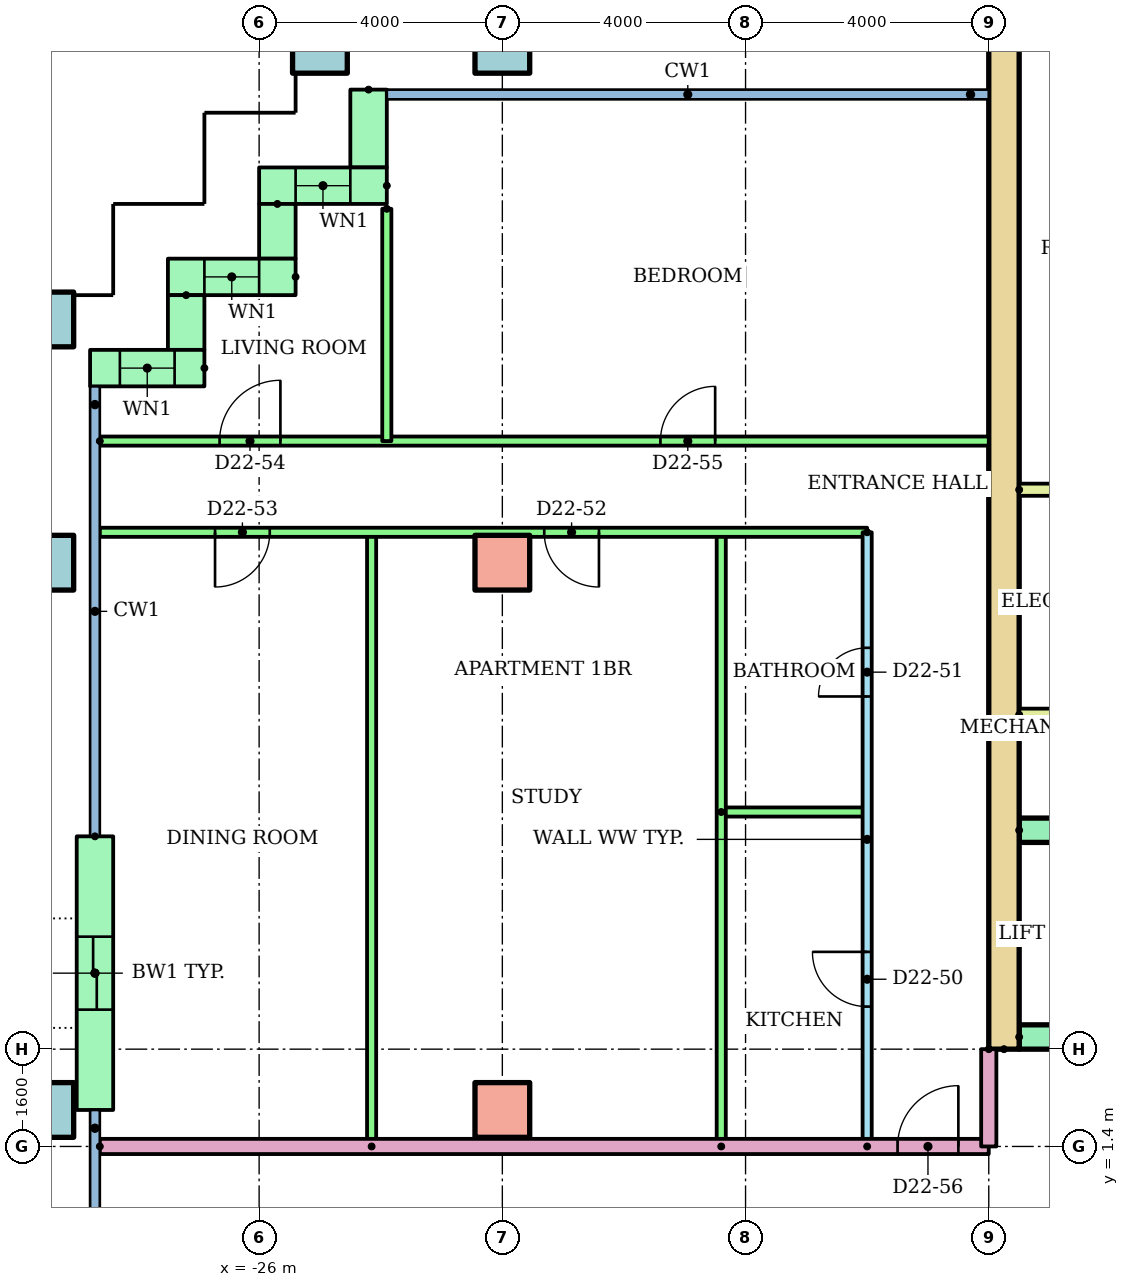
"""IFC4 building model, lengths in metres.
Left out: names, types, materials, properties, quantities, classifications, styles, units other than length and angle.
Written with IfcOpenShell. Run it as: python <this file> out.ifc"""

import sys

from ifc_helpers import new_model, si_unit, direction, frame, frame_2d, origin, origin_2d, place, context, subcontext, project, spatial, rectangle, hollow_rectangle, extrude, element, fill, save


model = new_model("IFC4")
c1 = context("Model", 3, precision=1e-05, world=origin(), true_north=direction((0.0, 1.0)))
c2 = subcontext(c1, "Body", "Model", "MODEL_VIEW")
j1 = project(units=[si_unit("LENGTHUNIT", "METRE"), si_unit("PLANEANGLEUNIT", "RADIAN")], contexts=[c1])
p1 = place(None, origin())
s1 = spatial("IfcSite", under=j1, at=p1, CompositionType="ELEMENT")
p2 = place(p1, origin())
s2 = spatial("IfcBuilding", under=s1, at=p2, CompositionType="ELEMENT")
p3 = place(p2, frame((0.0, 0.0, 87.1)))
s3 = spatial("IfcBuildingStorey", under=s2, at=p3, CompositionType="ELEMENT", Elevation=87.1)
p4 = place(p3, frame((-29.5, 2.0, 0.0)))
e1 = element("IfcColumn", 1, at=p4, inside=s3, PredefinedType="COLUMN", context=c2, shape_type="SweptSolid", body=[
    extrude(hollow_rectangle(XDim=0.9, YDim=0.9, WallThickness=0.045, at=origin_2d()), origin(), (0.0, 0.0, 1.0), 3.2),
])
p5 = place(p3, frame((-22.0, 2.0, 0.0)))
e2 = element("IfcColumn", 2, at=p5, inside=s3, PredefinedType="COLUMN", context=c2, shape_type="SweptSolid", body=[
    extrude(rectangle(XDim=0.9, YDim=0.9, at=origin_2d()), origin(), (0.0, 0.0, 1.0), 3.2),
])
p6 = place(p3, frame((-29.5, 11.0, 0.0)))
e3 = element("IfcColumn", 3, at=p6, inside=s3, PredefinedType="COLUMN", context=c2, shape_type="SweptSolid", body=[
    extrude(hollow_rectangle(XDim=0.9, YDim=0.9, WallThickness=0.045, at=origin_2d()), origin(), (0.0, 0.0, 1.0), 3.2),
])
p7 = place(p3, frame((-22.0, 11.0, 0.0)))
e4 = element("IfcColumn", 4, at=p7, inside=s3, PredefinedType="COLUMN", context=c2, shape_type="SweptSolid", body=[
    extrude(rectangle(XDim=0.9, YDim=0.9, at=origin_2d()), origin(), (0.0, 0.0, 1.0), 3.2),
])
for number, where in (
    (5, (-29.5, 15.0, 0.0)),
    (6, (-25.0, 19.5, 0.0)),
    (7, (-22.0, 19.5, 0.0)),
):
    element("IfcColumn", number, at=place(p3, frame(where)), inside=s3, PredefinedType="COLUMN", context=c2, shape_type="SweptSolid", body=[
        extrude(hollow_rectangle(XDim=0.9, YDim=0.9, WallThickness=0.045, at=origin_2d()), origin(), (0.0, 0.0, 1.0), 3.2),
    ])
p8 = place(p3, frame((-24.2, 18.78, 0.0), z_axis=(0.0, 0.0, 1.0), x_axis=(0.0, -1.0, 0.0)))
e8 = element("IfcWall", 8, at=p8, inside=s3, PredefinedType="STANDARD", context=c2, shape_type="SweptSolid", body=[
    extrude(rectangle(XDim=1.28, YDim=0.6, at=frame_2d((0.64, 0.0))), origin(), (0.0, 0.0, 1.0), 2.92),
])
p9 = place(p3, frame((-23.9, 17.2, 0.0), z_axis=(0.0, 0.0, 1.0), x_axis=(-1.0, 0.0, 0.0)))
e9 = element("IfcWall", 9, at=p9, inside=s3, PredefinedType="STANDARD", context=c2, shape_type="SweptSolid", body=[
    extrude(rectangle(XDim=2.1, YDim=0.6, at=frame_2d((1.05, 0.0))), origin(), (0.0, 0.0, 1.0), 2.92),
])
p10 = place(p9, frame((0.6, 0.0, 0.9)))
e10 = element("IfcOpeningElement", 10, at=p10, cuts=e9, PredefinedType="OPENING", context=c2, shape_type="SweptSolid", body=[
    extrude(rectangle(XDim=0.9, YDim=1.5, at=frame_2d((0.45, 0.75))), frame((0.0, 0.31, 0.0), z_axis=(0.0, -1.0, 0.0), x_axis=(1.0, 0.0, 0.0)), (0.0, 0.0, 1.0), 0.62),
])
p11 = place(p3, frame((-25.7, 16.9, 0.0), z_axis=(0.0, 0.0, 1.0), x_axis=(0.0, -1.0, 0.0)))
e11 = element("IfcWall", 11, at=p11, inside=s3, PredefinedType="STANDARD", context=c2, shape_type="SweptSolid", body=[
    extrude(rectangle(XDim=0.9, YDim=0.6, at=frame_2d((0.45, 0.0))), origin(), (0.0, 0.0, 1.0), 2.92),
])
p12 = place(p3, frame((-25.4, 15.7, 0.0), z_axis=(0.0, 0.0, 1.0), x_axis=(-1.0, 0.0, 0.0)))
e12 = element("IfcWall", 12, at=p12, inside=s3, PredefinedType="STANDARD", context=c2, shape_type="SweptSolid", body=[
    extrude(rectangle(XDim=2.1, YDim=0.6, at=frame_2d((1.05, 0.0))), origin(), (0.0, 0.0, 1.0), 2.92),
])
p13 = place(p12, frame((0.6, 0.0, 0.9)))
e13 = element("IfcOpeningElement", 13, at=p13, cuts=e12, PredefinedType="OPENING", context=c2, shape_type="SweptSolid", body=[
    extrude(rectangle(XDim=0.9, YDim=1.5, at=frame_2d((0.45, 0.75))), frame((0.0, 0.31, 0.0), z_axis=(0.0, -1.0, 0.0), x_axis=(1.0, 0.0, 0.0)), (0.0, 0.0, 1.0), 0.62),
])
p14 = place(p3, frame((-27.2, 15.4, 0.0), z_axis=(0.0, 0.0, 1.0), x_axis=(0.0, -1.0, 0.0)))
e14 = element("IfcWall", 14, at=p14, inside=s3, PredefinedType="STANDARD", context=c2, shape_type="SweptSolid", body=[
    extrude(rectangle(XDim=0.9, YDim=0.6, at=frame_2d((0.45, 0.0))), origin(), (0.0, 0.0, 1.0), 2.92),
])
p15 = place(p3, frame((-26.9, 14.2, 0.0), z_axis=(0.0, 0.0, 1.0), x_axis=(-1.0, 0.0, 0.0)))
e15 = element("IfcWall", 15, at=p15, inside=s3, PredefinedType="STANDARD", context=c2, shape_type="SweptSolid", body=[
    extrude(rectangle(XDim=1.88, YDim=0.6, at=frame_2d((0.94, 0.0))), origin(), (0.0, 0.0, 1.0), 2.92),
])
p16 = place(p15, frame((0.49, 0.0, 0.9)))
e16 = element("IfcOpeningElement", 16, at=p16, cuts=e15, PredefinedType="OPENING", context=c2, shape_type="SweptSolid", body=[
    extrude(rectangle(XDim=0.9, YDim=1.5, at=frame_2d((0.45, 0.75))), frame((0.0, 0.31, 0.0), z_axis=(0.0, -1.0, 0.0), x_axis=(1.0, 0.0, 0.0)), (0.0, 0.0, 1.0), 0.62),
])
p17 = place(p3, frame((-28.7, 6.5, 0.0), z_axis=(0.0, 0.0, 1.0), x_axis=(0.0, -1.0, 0.0)))
e17 = element("IfcWall", 17, at=p17, inside=s3, PredefinedType="STANDARD", context=c2, shape_type="SweptSolid", body=[
    extrude(rectangle(XDim=4.5, YDim=0.6, at=frame_2d((2.25, 0.0))), origin(), (0.0, 0.0, 1.0), 2.92),
])
p18 = place(p17, frame((1.65, 0.0, 0.0)))
e18 = element("IfcOpeningElement", 18, at=p18, cuts=e17, PredefinedType="OPENING", context=c2, shape_type="SweptSolid", body=[
    extrude(rectangle(XDim=1.2, YDim=2.1, at=frame_2d((0.6, 1.05))), frame((0.0, 0.31, 0.0), z_axis=(0.0, -1.0, 0.0), x_axis=(1.0, 0.0, 0.0)), (0.0, 0.0, 1.0), 0.62),
])
p19 = place(p3, frame((-13.75, 3.0, 0.0), z_axis=(0.0, 0.0, 1.0), x_axis=(0.0, 1.0, 0.0)))
e19 = element("IfcWall", 19, at=p19, inside=s3, PredefinedType="SHEAR", context=c2, shape_type="SweptSolid", body=[
    extrude(rectangle(XDim=17.0, YDim=0.5, at=frame_2d((8.5, 0.0))), origin(), (0.0, 0.0, 1.0), 2.92),
])
p20 = place(p3, frame((-13.5, 3.2, 0.0)))
e20 = element("IfcWall", 20, at=p20, inside=s3, PredefinedType="SHEAR", context=c2, shape_type="SweptSolid", body=[
    extrude(rectangle(XDim=27.0, YDim=0.4, at=frame_2d((13.5, 0.0))), origin(), (0.0, 0.0, 1.0), 2.92),
])
p21 = place(p20, frame((6.861, 0.0, 0.0)))
e21 = element("IfcOpeningElement", 21, at=p21, cuts=e20, PredefinedType="OPENING", context=c2, shape_type="SweptSolid", body=[
    extrude(rectangle(XDim=1.1, YDim=2.1, at=frame_2d((0.55, 1.05))), frame((0.0, 0.21, 0.0), z_axis=(0.0, -1.0, 0.0), x_axis=(1.0, 0.0, 0.0)), (0.0, 0.0, 1.0), 0.42),
])
p22 = place(p20, frame((9.906, 0.0, 0.0)))
e22 = element("IfcOpeningElement", 22, at=p22, cuts=e20, PredefinedType="OPENING", context=c2, shape_type="SweptSolid", body=[
    extrude(rectangle(XDim=1.1, YDim=2.1, at=frame_2d((0.55, 1.05))), frame((0.0, 0.21, 0.0), z_axis=(0.0, -1.0, 0.0), x_axis=(1.0, 0.0, 0.0)), (0.0, 0.0, 1.0), 0.42),
])
p23 = place(p20, frame((15.994, 0.0, 0.0)))
e23 = element("IfcOpeningElement", 23, at=p23, cuts=e20, PredefinedType="OPENING", context=c2, shape_type="SweptSolid", body=[
    extrude(rectangle(XDim=1.1, YDim=2.1, at=frame_2d((0.55, 1.05))), frame((0.0, 0.21, 0.0), z_axis=(0.0, -1.0, 0.0), x_axis=(1.0, 0.0, 0.0)), (0.0, 0.0, 1.0), 0.42),
])
p24 = place(p20, frame((19.039, 0.0, 0.0)))
e24 = element("IfcOpeningElement", 24, at=p24, cuts=e20, PredefinedType="OPENING", context=c2, shape_type="SweptSolid", body=[
    extrude(rectangle(XDim=1.1, YDim=2.1, at=frame_2d((0.55, 1.05))), frame((0.0, 0.21, 0.0), z_axis=(0.0, -1.0, 0.0), x_axis=(1.0, 0.0, 0.0)), (0.0, 0.0, 1.0), 0.42),
])
p25 = place(p20, frame((12.6, 0.0, 0.0)))
e25 = element("IfcOpeningElement", 25, at=p25, cuts=e20, PredefinedType="OPENING", context=c2, shape_type="SweptSolid", body=[
    extrude(rectangle(XDim=1.8, YDim=2.1, at=frame_2d((0.9, 1.05))), frame((0.0, 0.21, 0.0), z_axis=(0.0, -1.0, 0.0), x_axis=(1.0, 0.0, 0.0)), (0.0, 0.0, 1.0), 0.42),
])
p26 = place(p3, frame((-13.5, 6.6, 0.0)))
e26 = element("IfcWall", 26, at=p26, inside=s3, PredefinedType="SHEAR", context=c2, shape_type="SweptSolid", body=[
    extrude(rectangle(XDim=11.978, YDim=0.4, at=frame_2d((5.989, 0.0))), origin(), (0.0, 0.0, 1.0), 2.92),
])
for number, where in (
    (27, (-13.5, 8.5, 0.0)),
    (28, (-13.5, 12.2, 0.0)),
):
    element("IfcWall", number, at=place(p3, frame(where)), inside=s3, PredefinedType="PARTITIONING", context=c2, shape_type="SweptSolid", body=[
        extrude(rectangle(XDim=3.9, YDim=0.2, at=frame_2d((1.95, 0.0))), origin(), (0.0, 0.0, 1.0), 2.92),
    ])
p27 = place(p3, frame((-16.0, 1.4, 0.0), z_axis=(0.0, 0.0, 1.0), x_axis=(0.0, 1.0, 0.0)))
e29 = element("IfcWall", 29, at=p27, inside=s3, PredefinedType="PARTITIONING", context=c2, shape_type="SweptSolid", body=[
    extrude(rectangle(XDim=10.1, YDim=0.15, at=frame_2d((5.05, 0.0))), origin(), (0.0, 0.0, 1.0), 2.4),
])
p28 = place(p27, frame((2.3, 0.0, 0.0)))
e30 = element("IfcOpeningElement", 30, at=p28, cuts=e29, PredefinedType="OPENING", context=c2, shape_type="SweptSolid", body=[
    extrude(rectangle(XDim=0.9, YDim=2.1, at=frame_2d((0.45, 1.05))), frame((0.0, 0.085, 0.0), z_axis=(0.0, -1.0, 0.0), x_axis=(1.0, 0.0, 0.0)), (0.0, 0.0, 1.0), 0.17),
])
p29 = place(p27, frame((7.4, 0.0, 0.0)))
e31 = element("IfcOpeningElement", 31, at=p29, cuts=e29, PredefinedType="OPENING", context=c2, shape_type="SweptSolid", body=[
    extrude(rectangle(XDim=0.8, YDim=2.1, at=frame_2d((0.4, 1.05))), frame((0.0, 0.085, 0.0), z_axis=(0.0, -1.0, 0.0), x_axis=(1.0, 0.0, 0.0)), (0.0, 0.0, 1.0), 0.17),
])
p30 = place(p3, frame((-18.4, 6.9, 0.0)))
e32 = element("IfcWall", 32, at=p30, inside=s3, PredefinedType="PARTITIONING", context=c2, shape_type="SweptSolid", body=[
    extrude(rectangle(XDim=2.4, YDim=0.15, at=frame_2d((1.2, 0.0))), origin(), (0.0, 0.0, 1.0), 2.4),
])
for number, where, z_axis, x_axis in (
    (33, (-18.4, 1.4, 0.0), (0.0, 0.0, 1.0), (0.0, 1.0, 0.0)),
    (34, (-24.15, 1.4, 0.0), (0.0, 0.0, 1.0), (0.0, 1.0, 0.0)),
):
    element("IfcWall", number, at=place(p3, frame(where, z_axis=z_axis, x_axis=x_axis)), inside=s3, PredefinedType="PARTITIONING", context=c2, shape_type="SweptSolid", body=[
        extrude(rectangle(XDim=10.1, YDim=0.15, at=frame_2d((5.05, 0.0))), origin(), (0.0, 0.0, 1.0), 2.4),
    ])
p31 = place(p3, frame((-16.0, 11.5, 0.0), z_axis=(0.0, 0.0, 1.0), x_axis=(-1.0, 0.0, 0.0)))
e35 = element("IfcWall", 35, at=p31, inside=s3, PredefinedType="PARTITIONING", context=c2, shape_type="SweptSolid", body=[
    extrude(rectangle(XDim=12.62, YDim=0.15, at=frame_2d((6.31, 0.0))), origin(), (0.0, 0.0, 1.0), 2.4),
])
p32 = place(p31, frame((4.411, 0.0, 0.0)))
e36 = element("IfcOpeningElement", 36, at=p32, cuts=e35, PredefinedType="OPENING", context=c2, shape_type="SweptSolid", body=[
    extrude(rectangle(XDim=0.9, YDim=2.1, at=frame_2d((0.45, 1.05))), frame((0.0, 0.085, 0.0), z_axis=(0.0, -1.0, 0.0), x_axis=(1.0, 0.0, 0.0)), (0.0, 0.0, 1.0), 0.17),
])
p33 = place(p31, frame((9.825, 0.0, 0.0)))
e37 = element("IfcOpeningElement", 37, at=p33, cuts=e35, PredefinedType="OPENING", context=c2, shape_type="SweptSolid", body=[
    extrude(rectangle(XDim=0.9, YDim=2.1, at=frame_2d((0.45, 1.05))), frame((0.0, 0.085, 0.0), z_axis=(0.0, -1.0, 0.0), x_axis=(1.0, 0.0, 0.0)), (0.0, 0.0, 1.0), 0.17),
])
p34 = place(p3, frame((-28.62, 13.0, 0.0)))
e38 = element("IfcWall", 38, at=p34, inside=s3, PredefinedType="PARTITIONING", context=c2, shape_type="SweptSolid", body=[
    extrude(rectangle(XDim=14.62, YDim=0.15, at=frame_2d((7.31, 0.0))), origin(), (0.0, 0.0, 1.0), 2.4),
])
p35 = place(p34, frame((1.97, 0.0, 0.0)))
e39 = element("IfcOpeningElement", 39, at=p35, cuts=e38, PredefinedType="OPENING", context=c2, shape_type="SweptSolid", body=[
    extrude(rectangle(XDim=1.0, YDim=2.1, at=frame_2d((0.5, 1.05))), frame((0.0, 0.085, 0.0), z_axis=(0.0, -1.0, 0.0), x_axis=(1.0, 0.0, 0.0)), (0.0, 0.0, 1.0), 0.17),
])
p36 = place(p34, frame((9.22, 0.0, 0.0)))
e40 = element("IfcOpeningElement", 40, at=p36, cuts=e38, PredefinedType="OPENING", context=c2, shape_type="SweptSolid", body=[
    extrude(rectangle(XDim=0.9, YDim=2.1, at=frame_2d((0.45, 1.05))), frame((0.0, 0.085, 0.0), z_axis=(0.0, -1.0, 0.0), x_axis=(1.0, 0.0, 0.0)), (0.0, 0.0, 1.0), 0.17),
])
p37 = place(p3, frame((-23.9, 16.82, 0.0), z_axis=(0.0, 0.0, 1.0), x_axis=(0.0, -1.0, 0.0)))
e41 = element("IfcWall", 41, at=p37, inside=s3, PredefinedType="PARTITIONING", context=c2, shape_type="SweptSolid", body=[
    extrude(rectangle(XDim=3.82, YDim=0.15, at=frame_2d((1.91, 0.0))), origin(), (0.0, 0.0, 1.0), 2.4),
])
p38 = place(p3, frame((-28.62, 1.4, 0.0)))
e42 = element("IfcWall", 42, at=p38, inside=s3, PredefinedType="PARTITIONING", context=c2, shape_type="SweptSolid", body=[
    extrude(rectangle(XDim=14.62, YDim=0.25, at=frame_2d((7.31, 0.0))), origin(), (0.0, 0.0, 1.0), 2.4),
])
p39 = place(p38, frame((13.12, 0.0, 0.0)))
e43 = element("IfcOpeningElement", 43, at=p39, cuts=e42, PredefinedType="OPENING", context=c2, shape_type="SweptSolid", body=[
    extrude(rectangle(XDim=1.0, YDim=2.1, at=frame_2d((0.5, 1.05))), frame((0.0, 0.135, 0.0), z_axis=(0.0, -1.0, 0.0), x_axis=(1.0, 0.0, 0.0)), (0.0, 0.0, 1.0), 0.27),
])
p40 = place(p3, frame((-14.0, 3.0, 0.0), z_axis=(0.0, 0.0, 1.0), x_axis=(0.0, -1.0, 0.0)))
e44 = element("IfcWall", 44, at=p40, inside=s3, PredefinedType="PARTITIONING", context=c2, shape_type="SweptSolid", body=[
    extrude(rectangle(XDim=1.6, YDim=0.25, at=frame_2d((0.8, 0.0))), origin(), (0.0, 0.0, 1.0), 2.4),
])
p41 = place(p10, origin())
e45 = element("IfcWindow", 45, at=p41, inside=s3, PartitioningType="SINGLE_PANEL", PredefinedType="WINDOW", context=c2, shape_type="SweptSolid", body=[
    extrude(rectangle(XDim=0.9, YDim=1.5, at=frame_2d((0.45, 0.75))), frame((0.0, 0.03, 0.0), z_axis=(0.0, -1.0, 0.0), x_axis=(1.0, 0.0, 0.0)), (0.0, 0.0, 1.0), 0.06),
])
fill(e10, e45)
p42 = place(p13, origin())
e46 = element("IfcWindow", 46, at=p42, inside=s3, PartitioningType="SINGLE_PANEL", PredefinedType="WINDOW", context=c2, shape_type="SweptSolid", body=[
    extrude(rectangle(XDim=0.9, YDim=1.5, at=frame_2d((0.45, 0.75))), frame((0.0, 0.03, 0.0), z_axis=(0.0, -1.0, 0.0), x_axis=(1.0, 0.0, 0.0)), (0.0, 0.0, 1.0), 0.06),
])
fill(e13, e46)
p43 = place(p16, origin())
e47 = element("IfcWindow", 47, at=p43, inside=s3, PartitioningType="SINGLE_PANEL", PredefinedType="WINDOW", context=c2, shape_type="SweptSolid", body=[
    extrude(rectangle(XDim=0.9, YDim=1.5, at=frame_2d((0.45, 0.75))), frame((0.0, 0.03, 0.0), z_axis=(0.0, -1.0, 0.0), x_axis=(1.0, 0.0, 0.0)), (0.0, 0.0, 1.0), 0.06),
])
fill(e16, e47)
p44 = place(p28, origin())
e48 = element("IfcDoor", 48, at=p44, inside=s3, OperationType="SINGLE_SWING_RIGHT", PredefinedType="DOOR", context=c2, shape_type="SweptSolid", body=[
    extrude(rectangle(XDim=0.9, YDim=2.1, at=frame_2d((0.45, 1.05))), frame((0.0, 0.025, 0.0), z_axis=(0.0, -1.0, 0.0), x_axis=(1.0, 0.0, 0.0)), (0.0, 0.0, 1.0), 0.05),
])
fill(e30, e48)
p45 = place(p29, origin())
e49 = element("IfcDoor", 49, at=p45, inside=s3, OperationType="SINGLE_SWING_LEFT", PredefinedType="DOOR", context=c2, shape_type="SweptSolid", body=[
    extrude(rectangle(XDim=0.8, YDim=2.1, at=frame_2d((0.4, 1.05))), frame((0.0, 0.025, 0.0), z_axis=(0.0, -1.0, 0.0), x_axis=(1.0, 0.0, 0.0)), (0.0, 0.0, 1.0), 0.05),
])
fill(e31, e49)
p46 = place(p32, origin())
e50 = element("IfcDoor", 50, at=p46, inside=s3, OperationType="SINGLE_SWING_LEFT", PredefinedType="DOOR", context=c2, shape_type="SweptSolid", body=[
    extrude(rectangle(XDim=0.9, YDim=2.1, at=frame_2d((0.45, 1.05))), frame((0.0, 0.025, 0.0), z_axis=(0.0, -1.0, 0.0), x_axis=(1.0, 0.0, 0.0)), (0.0, 0.0, 1.0), 0.05),
])
fill(e36, e50)
p47 = place(p33, origin())
e51 = element("IfcDoor", 51, at=p47, inside=s3, OperationType="SINGLE_SWING_RIGHT", PredefinedType="DOOR", context=c2, shape_type="SweptSolid", body=[
    extrude(rectangle(XDim=0.9, YDim=2.1, at=frame_2d((0.45, 1.05))), frame((0.0, 0.025, 0.0), z_axis=(0.0, -1.0, 0.0), x_axis=(1.0, 0.0, 0.0)), (0.0, 0.0, 1.0), 0.05),
])
fill(e37, e51)
p48 = place(p35, origin())
e52 = element("IfcDoor", 52, at=p48, inside=s3, OperationType="SINGLE_SWING_RIGHT", PredefinedType="DOOR", context=c2, shape_type="SweptSolid", body=[
    extrude(rectangle(XDim=1.0, YDim=2.1, at=frame_2d((0.5, 1.05))), frame((0.0, 0.025, 0.0), z_axis=(0.0, -1.0, 0.0), x_axis=(1.0, 0.0, 0.0)), (0.0, 0.0, 1.0), 0.05),
])
fill(e39, e52)
p49 = place(p36, origin())
e53 = element("IfcDoor", 53, at=p49, inside=s3, OperationType="SINGLE_SWING_RIGHT", PredefinedType="DOOR", context=c2, shape_type="SweptSolid", body=[
    extrude(rectangle(XDim=0.9, YDim=2.1, at=frame_2d((0.45, 1.05))), frame((0.0, 0.025, 0.0), z_axis=(0.0, -1.0, 0.0), x_axis=(1.0, 0.0, 0.0)), (0.0, 0.0, 1.0), 0.05),
])
fill(e40, e53)
p50 = place(p39, origin())
e54 = element("IfcDoor", 54, at=p50, inside=s3, OperationType="SINGLE_SWING_RIGHT", PredefinedType="DOOR", context=c2, shape_type="SweptSolid", body=[
    extrude(rectangle(XDim=1.0, YDim=2.1, at=frame_2d((0.5, 1.05))), frame((0.0, 0.025, 0.0), z_axis=(0.0, -1.0, 0.0), x_axis=(1.0, 0.0, 0.0)), (0.0, 0.0, 1.0), 0.05),
])
fill(e43, e54)
p51 = place(p18, origin())
e55 = element("IfcDoor", 55, at=p51, inside=s3, OperationType="SLIDING_TO_LEFT", PredefinedType="DOOR", context=c2, shape_type="SweptSolid", body=[
    extrude(rectangle(XDim=1.2, YDim=2.1, at=frame_2d((0.6, 1.05))), frame((0.0, 0.025, 0.0), z_axis=(0.0, -1.0, 0.0), x_axis=(1.0, 0.0, 0.0)), (0.0, 0.0, 1.0), 0.05),
])
fill(e18, e55)
save(model, sys.argv[1])
